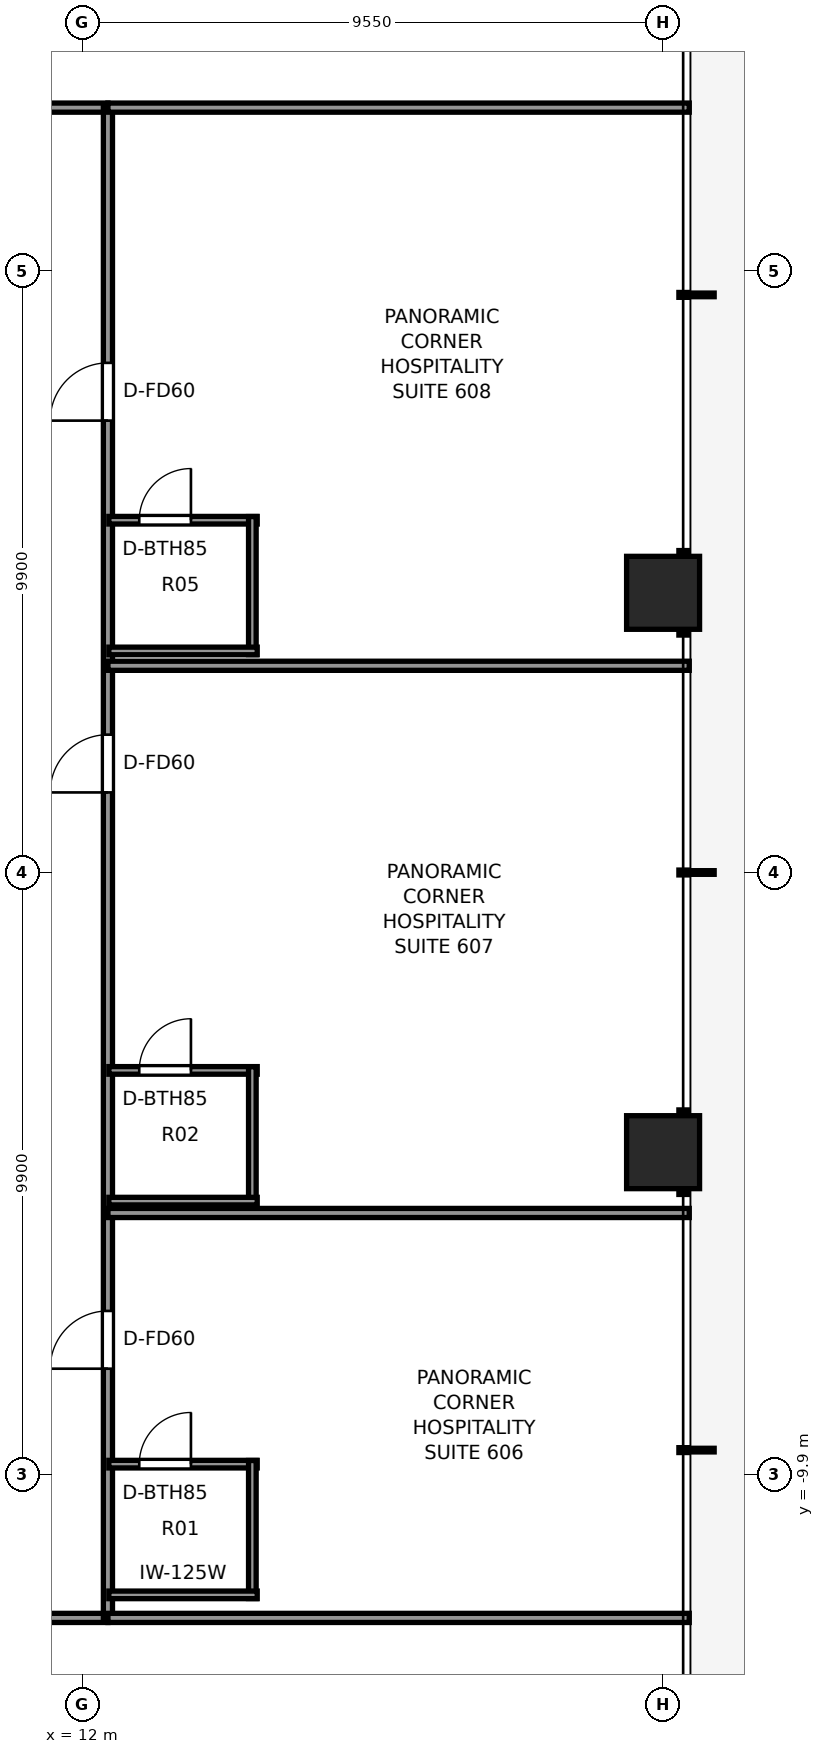
"""IFC4 building model, lengths in metres.
Left out: names, types, materials, properties, quantities, classifications, styles, units other than length and angle.
Written with IfcOpenShell. Run it as: python <this file> out.ifc"""

import sys

from ifc_helpers import new_model, si_unit, direction, frame, frame_2d, origin, origin_2d, place, context, subcontext, project, spatial, rectangle, extrude, element, fill, save


model = new_model("IFC4")
c1 = context("Model", 3, precision=1e-05, world=origin(), true_north=direction((0.0, 1.0)))
c2 = subcontext(c1, "Body", "Model", "MODEL_VIEW")
j1 = project(units=[si_unit("LENGTHUNIT", "METRE"), si_unit("PLANEANGLEUNIT", "RADIAN")], contexts=[c1])
p1 = place(None, origin())
s1 = spatial("IfcSite", under=j1, at=p1, CompositionType="ELEMENT")
p2 = place(p1, origin())
s2 = spatial("IfcBuilding", under=s1, at=p2, CompositionType="ELEMENT")
p3 = place(p2, frame((0.0, 0.0, 23.8)))
s3 = spatial("IfcBuildingStorey", under=s2, at=p3, CompositionType="ELEMENT", Elevation=23.8)
for number, where, z_axis, x_axis in (
    (1, (21.55, -4.6, 0.0), (0.0, 0.0, 1.0), (1.0, 0.0, 0.0)),
    (2, (21.55, 4.6, 0.0), (0.0, 0.0, 1.0), (1.0, 0.0, 0.0)),
):
    element("IfcColumn", number, at=place(p3, frame(where, z_axis=z_axis, x_axis=x_axis)), inside=s3, PredefinedType="COLUMN", context=c2, shape_type="SweptSolid", body=[
        extrude(rectangle(XDim=1.2, YDim=1.2, at=origin_2d()), origin(), (0.0, 0.0, 1.0), 3.3),
    ])
p4 = place(p3, frame((-12.26, -12.26, 0.0), z_axis=(0.0, 0.0, 1.0), x_axis=(1.0, 0.0, 0.0)))
e3 = element("IfcWall", 3, at=p4, inside=s3, PredefinedType="PARTITIONING", context=c2, shape_type="SweptSolid", body=[
    extrude(rectangle(XDim=24.68, YDim=0.15, at=frame_2d((12.34, 0.0))), origin(), (0.0, 0.0, 1.0), 2.272),
])
p5 = place(p4, frame((3.444, 0.0, 0.0)))
e4 = element("IfcOpeningElement", 4, at=p5, cuts=e3, PredefinedType="OPENING", context=c2, shape_type="SweptSolid", body=[
    extrude(rectangle(XDim=0.9, YDim=2.06, at=frame_2d((0.45, 1.03))), frame((0.0, 0.085, 0.0), z_axis=(0.0, -1.0, 0.0), x_axis=(1.0, 0.0, 0.0)), (0.0, 0.0, 1.0), 0.17),
])
p6 = place(p4, frame((5.779, 0.0, 0.0)))
e5 = element("IfcOpeningElement", 5, at=p6, cuts=e3, PredefinedType="OPENING", context=c2, shape_type="SweptSolid", body=[
    extrude(rectangle(XDim=0.9, YDim=2.06, at=frame_2d((0.45, 1.03))), frame((0.0, 0.085, 0.0), z_axis=(0.0, -1.0, 0.0), x_axis=(1.0, 0.0, 0.0)), (0.0, 0.0, 1.0), 0.17),
])
p7 = place(p4, frame((13.551, 0.0, 0.0)))
e6 = element("IfcOpeningElement", 6, at=p7, cuts=e3, PredefinedType="OPENING", context=c2, shape_type="SweptSolid", body=[
    extrude(rectangle(XDim=0.9, YDim=2.06, at=frame_2d((0.45, 1.03))), frame((0.0, 0.085, 0.0), z_axis=(0.0, -1.0, 0.0), x_axis=(1.0, 0.0, 0.0)), (0.0, 0.0, 1.0), 0.17),
])
p8 = place(p4, frame((17.921, 0.0, 0.0)))
e7 = element("IfcOpeningElement", 7, at=p8, cuts=e3, PredefinedType="OPENING", context=c2, shape_type="SweptSolid", body=[
    extrude(rectangle(XDim=0.9, YDim=2.06, at=frame_2d((0.45, 1.03))), frame((0.0, 0.085, 0.0), z_axis=(0.0, -1.0, 0.0), x_axis=(1.0, 0.0, 0.0)), (0.0, 0.0, 1.0), 0.17),
])
p9 = place(p4, frame((20.256, 0.0, 0.0)))
e8 = element("IfcOpeningElement", 8, at=p9, cuts=e3, PredefinedType="OPENING", context=c2, shape_type="SweptSolid", body=[
    extrude(rectangle(XDim=0.9, YDim=2.06, at=frame_2d((0.45, 1.03))), frame((0.0, 0.085, 0.0), z_axis=(0.0, -1.0, 0.0), x_axis=(1.0, 0.0, 0.0)), (0.0, 0.0, 1.0), 0.17),
])
p10 = place(p3, frame((-12.26, 12.58, 0.0), z_axis=(0.0, 0.0, 1.0), x_axis=(1.0, 0.0, 0.0)))
e9 = element("IfcWall", 9, at=p10, inside=s3, PredefinedType="PARTITIONING", context=c2, shape_type="SweptSolid", body=[
    extrude(rectangle(XDim=24.68, YDim=0.15, at=frame_2d((12.34, 0.0))), origin(), (0.0, 0.0, 1.0), 2.272),
])
p11 = place(p10, frame((3.444, 0.0, 0.0)))
e10 = element("IfcOpeningElement", 10, at=p11, cuts=e9, PredefinedType="OPENING", context=c2, shape_type="SweptSolid", body=[
    extrude(rectangle(XDim=0.9, YDim=2.06, at=frame_2d((0.45, 1.03))), frame((0.0, 0.085, 0.0), z_axis=(0.0, -1.0, 0.0), x_axis=(1.0, 0.0, 0.0)), (0.0, 0.0, 1.0), 0.17),
])
p12 = place(p10, frame((9.78, 0.0, 0.0)))
e11 = element("IfcOpeningElement", 11, at=p12, cuts=e9, PredefinedType="OPENING", context=c2, shape_type="SweptSolid", body=[
    extrude(rectangle(XDim=0.9, YDim=2.06, at=frame_2d((0.45, 1.03))), frame((0.0, 0.085, 0.0), z_axis=(0.0, -1.0, 0.0), x_axis=(1.0, 0.0, 0.0)), (0.0, 0.0, 1.0), 0.17),
])
p13 = place(p10, frame((19.345, 0.0, 0.0)))
e12 = element("IfcOpeningElement", 12, at=p13, cuts=e9, PredefinedType="OPENING", context=c2, shape_type="SweptSolid", body=[
    extrude(rectangle(XDim=0.9, YDim=2.06, at=frame_2d((0.45, 1.03))), frame((0.0, 0.085, 0.0), z_axis=(0.0, -1.0, 0.0), x_axis=(1.0, 0.0, 0.0)), (0.0, 0.0, 1.0), 0.17),
])
p14 = place(p3, frame((12.42, -12.26, 0.0), z_axis=(0.0, 0.0, 1.0), x_axis=(0.0, 1.0, 0.0)))
e13 = element("IfcWall", 13, at=p14, inside=s3, PredefinedType="PARTITIONING", context=c2, shape_type="SweptSolid", body=[
    extrude(rectangle(XDim=24.84, YDim=0.15, at=frame_2d((12.42, 0.0))), origin(), (0.0, 0.0, 1.0), 2.272),
])
p15 = place(p14, frame((4.099, 0.0, 0.0)))
e14 = element("IfcOpeningElement", 14, at=p15, cuts=e13, PredefinedType="OPENING", context=c2, shape_type="SweptSolid", body=[
    extrude(rectangle(XDim=0.95, YDim=2.06, at=frame_2d((0.475, 1.03))), frame((0.0, 0.085, 0.0), z_axis=(0.0, -1.0, 0.0), x_axis=(1.0, 0.0, 0.0)), (0.0, 0.0, 1.0), 0.17),
])
p16 = place(p14, frame((13.577, 0.0, 0.0)))
e15 = element("IfcOpeningElement", 15, at=p16, cuts=e13, PredefinedType="OPENING", context=c2, shape_type="SweptSolid", body=[
    extrude(rectangle(XDim=0.95, YDim=2.06, at=frame_2d((0.475, 1.03))), frame((0.0, 0.085, 0.0), z_axis=(0.0, -1.0, 0.0), x_axis=(1.0, 0.0, 0.0)), (0.0, 0.0, 1.0), 0.17),
])
p17 = place(p14, frame((19.692, 0.0, 0.0)))
e16 = element("IfcOpeningElement", 16, at=p17, cuts=e13, PredefinedType="OPENING", context=c2, shape_type="SweptSolid", body=[
    extrude(rectangle(XDim=0.95, YDim=2.06, at=frame_2d((0.475, 1.03))), frame((0.0, 0.085, 0.0), z_axis=(0.0, -1.0, 0.0), x_axis=(1.0, 0.0, 0.0)), (0.0, 0.0, 1.0), 0.17),
])
for number, where, z_axis, x_axis in (
    (17, (12.42, -12.26, 0.0), (0.0, 0.0, 1.0), (1.0, 0.0, 0.0)),
    (18, (12.42, 12.58, 0.0), (0.0, 0.0, 1.0), (1.0, 0.0, 0.0)),
):
    element("IfcWall", number, at=place(p3, frame(where, z_axis=z_axis, x_axis=x_axis)), inside=s3, PredefinedType="PARTITIONING", context=c2, shape_type="SweptSolid", body=[
        extrude(rectangle(XDim=9.56, YDim=0.15, at=frame_2d((4.78, 0.0))), origin(), (0.0, 0.0, 1.0), 2.272),
    ])
p18 = place(p3, frame((12.42, -5.6, 0.0), z_axis=(0.0, 0.0, 1.0), x_axis=(1.0, 0.0, 0.0)))
e19 = element("IfcWall", 19, at=p18, inside=s3, PredefinedType="PARTITIONING", context=c2, shape_type="SweptSolid", body=[
    extrude(rectangle(XDim=9.56, YDim=0.15, at=frame_2d((4.78, 0.0))), origin(), (0.0, 0.0, 1.0), 2.429),
])
p19 = place(p3, frame((12.435, -9.731, 0.0), z_axis=(0.0, 0.0, 1.0), x_axis=(1.0, 0.0, 0.0)))
e20 = element("IfcWall", 20, at=p19, inside=s3, PredefinedType="PARTITIONING", context=c2, shape_type="SweptSolid", body=[
    extrude(rectangle(XDim=2.44, YDim=0.125, at=frame_2d((1.22, 0.0))), origin(), (0.0, 0.0, 1.0), 3.06),
])
p20 = place(p19, frame((0.5, 0.0, 0.0)))
e21 = element("IfcOpeningElement", 21, at=p20, cuts=e20, PredefinedType="OPENING", context=c2, shape_type="SweptSolid", body=[
    extrude(rectangle(XDim=0.85, YDim=2.03, at=frame_2d((0.425, 1.015))), frame((0.0, 0.073, 0.0), z_axis=(0.0, -1.0, 0.0), x_axis=(1.0, 0.0, 0.0)), (0.0, 0.0, 1.0), 0.145),
])
p21 = place(p3, frame((14.795, -11.941, 0.0), z_axis=(0.0, 0.0, 1.0), x_axis=(0.0, 1.0, 0.0)))
e22 = element("IfcWall", 22, at=p21, inside=s3, PredefinedType="PARTITIONING", context=c2, shape_type="SweptSolid", body=[
    extrude(rectangle(XDim=2.27, YDim=0.125, at=frame_2d((1.135, 0.0))), origin(), (0.0, 0.0, 1.0), 2.272),
])
p22 = place(p3, frame((12.435, -11.881, 0.0), z_axis=(0.0, 0.0, 1.0), x_axis=(1.0, 0.0, 0.0)))
e23 = element("IfcWall", 23, at=p22, inside=s3, PredefinedType="PARTITIONING", context=c2, shape_type="SweptSolid", body=[
    extrude(rectangle(XDim=2.44, YDim=0.125, at=frame_2d((1.22, 0.0))), origin(), (0.0, 0.0, 1.0), 2.272),
])
p23 = place(p3, frame((12.42, 3.4, 0.0), z_axis=(0.0, 0.0, 1.0), x_axis=(1.0, 0.0, 0.0)))
e24 = element("IfcWall", 24, at=p23, inside=s3, PredefinedType="PARTITIONING", context=c2, shape_type="SweptSolid", body=[
    extrude(rectangle(XDim=9.56, YDim=0.15, at=frame_2d((4.78, 0.0))), origin(), (0.0, 0.0, 1.0), 2.429),
])
p24 = place(p3, frame((12.435, -3.255, 0.0), z_axis=(0.0, 0.0, 1.0), x_axis=(1.0, 0.0, 0.0)))
e25 = element("IfcWall", 25, at=p24, inside=s3, PredefinedType="PARTITIONING", context=c2, shape_type="SweptSolid", body=[
    extrude(rectangle(XDim=2.44, YDim=0.125, at=frame_2d((1.22, 0.0))), origin(), (0.0, 0.0, 1.0), 3.06),
])
p25 = place(p24, frame((0.5, 0.0, 0.0)))
e26 = element("IfcOpeningElement", 26, at=p25, cuts=e25, PredefinedType="OPENING", context=c2, shape_type="SweptSolid", body=[
    extrude(rectangle(XDim=0.85, YDim=2.03, at=frame_2d((0.425, 1.015))), frame((0.0, 0.073, 0.0), z_axis=(0.0, -1.0, 0.0), x_axis=(1.0, 0.0, 0.0)), (0.0, 0.0, 1.0), 0.145),
])
p26 = place(p3, frame((14.795, -5.465, 0.0), z_axis=(0.0, 0.0, 1.0), x_axis=(0.0, 1.0, 0.0)))
e27 = element("IfcWall", 27, at=p26, inside=s3, PredefinedType="PARTITIONING", context=c2, shape_type="SweptSolid", body=[
    extrude(rectangle(XDim=2.27, YDim=0.125, at=frame_2d((1.135, 0.0))), origin(), (0.0, 0.0, 1.0), 2.272),
])
p27 = place(p3, frame((12.435, -5.405, 0.0), z_axis=(0.0, 0.0, 1.0), x_axis=(1.0, 0.0, 0.0)))
e28 = element("IfcWall", 28, at=p27, inside=s3, PredefinedType="PARTITIONING", context=c2, shape_type="SweptSolid", body=[
    extrude(rectangle(XDim=2.44, YDim=0.125, at=frame_2d((1.22, 0.0))), origin(), (0.0, 0.0, 1.0), 3.06),
])
p28 = place(p3, frame((12.435, 5.794, 0.0), z_axis=(0.0, 0.0, 1.0), x_axis=(1.0, 0.0, 0.0)))
e29 = element("IfcWall", 29, at=p28, inside=s3, PredefinedType="PARTITIONING", context=c2, shape_type="SweptSolid", body=[
    extrude(rectangle(XDim=2.44, YDim=0.125, at=frame_2d((1.22, 0.0))), origin(), (0.0, 0.0, 1.0), 3.06),
])
p29 = place(p28, frame((0.5, 0.0, 0.0)))
e30 = element("IfcOpeningElement", 30, at=p29, cuts=e29, PredefinedType="OPENING", context=c2, shape_type="SweptSolid", body=[
    extrude(rectangle(XDim=0.85, YDim=2.03, at=frame_2d((0.425, 1.015))), frame((0.0, 0.073, 0.0), z_axis=(0.0, -1.0, 0.0), x_axis=(1.0, 0.0, 0.0)), (0.0, 0.0, 1.0), 0.145),
])
p30 = place(p3, frame((14.795, 3.584, 0.0), z_axis=(0.0, 0.0, 1.0), x_axis=(0.0, 1.0, 0.0)))
e31 = element("IfcWall", 31, at=p30, inside=s3, PredefinedType="PARTITIONING", context=c2, shape_type="SweptSolid", body=[
    extrude(rectangle(XDim=2.27, YDim=0.125, at=frame_2d((1.135, 0.0))), origin(), (0.0, 0.0, 1.0), 2.272),
])
p31 = place(p3, frame((12.435, 3.644, 0.0), z_axis=(0.0, 0.0, 1.0), x_axis=(1.0, 0.0, 0.0)))
e32 = element("IfcWall", 32, at=p31, inside=s3, PredefinedType="PARTITIONING", context=c2, shape_type="SweptSolid", body=[
    extrude(rectangle(XDim=2.44, YDim=0.125, at=frame_2d((1.22, 0.0))), origin(), (0.0, 0.0, 1.0), 3.06),
])
p32 = place(p20, origin())
e33 = element("IfcDoor", 33, at=p32, inside=s3, OperationType="SINGLE_SWING_RIGHT", PredefinedType="DOOR", context=c2, shape_type="SweptSolid", body=[
    extrude(rectangle(XDim=0.85, YDim=2.03, at=frame_2d((0.425, 1.015))), frame((0.0, 0.025, 0.0), z_axis=(0.0, -1.0, 0.0), x_axis=(1.0, 0.0, 0.0)), (0.0, 0.0, 1.0), 0.05),
])
fill(e21, e33)
p33 = place(p15, origin())
e34 = element("IfcDoor", 34, at=p33, inside=s3, OperationType="SINGLE_SWING_LEFT", PredefinedType="DOOR", context=c2, shape_type="SweptSolid", body=[
    extrude(rectangle(XDim=0.95, YDim=2.06, at=frame_2d((0.475, 1.03))), frame((0.0, 0.025, 0.0), z_axis=(0.0, -1.0, 0.0), x_axis=(1.0, 0.0, 0.0)), (0.0, 0.0, 1.0), 0.05),
])
fill(e14, e34)
p34 = place(p25, origin())
e35 = element("IfcDoor", 35, at=p34, inside=s3, OperationType="SINGLE_SWING_RIGHT", PredefinedType="DOOR", context=c2, shape_type="SweptSolid", body=[
    extrude(rectangle(XDim=0.85, YDim=2.03, at=frame_2d((0.425, 1.015))), frame((0.0, 0.025, 0.0), z_axis=(0.0, -1.0, 0.0), x_axis=(1.0, 0.0, 0.0)), (0.0, 0.0, 1.0), 0.05),
])
fill(e26, e35)
p35 = place(p16, origin())
e36 = element("IfcDoor", 36, at=p35, inside=s3, OperationType="SINGLE_SWING_LEFT", PredefinedType="DOOR", context=c2, shape_type="SweptSolid", body=[
    extrude(rectangle(XDim=0.95, YDim=2.06, at=frame_2d((0.475, 1.03))), frame((0.0, 0.025, 0.0), z_axis=(0.0, -1.0, 0.0), x_axis=(1.0, 0.0, 0.0)), (0.0, 0.0, 1.0), 0.05),
])
fill(e15, e36)
p36 = place(p29, origin())
e37 = element("IfcDoor", 37, at=p36, inside=s3, OperationType="SINGLE_SWING_RIGHT", PredefinedType="DOOR", context=c2, shape_type="SweptSolid", body=[
    extrude(rectangle(XDim=0.85, YDim=2.03, at=frame_2d((0.425, 1.015))), frame((0.0, 0.025, 0.0), z_axis=(0.0, -1.0, 0.0), x_axis=(1.0, 0.0, 0.0)), (0.0, 0.0, 1.0), 0.05),
])
fill(e30, e37)
p37 = place(p17, origin())
e38 = element("IfcDoor", 38, at=p37, inside=s3, OperationType="SINGLE_SWING_LEFT", PredefinedType="DOOR", context=c2, shape_type="SweptSolid", body=[
    extrude(rectangle(XDim=0.95, YDim=2.06, at=frame_2d((0.475, 1.03))), frame((0.0, 0.025, 0.0), z_axis=(0.0, -1.0, 0.0), x_axis=(1.0, 0.0, 0.0)), (0.0, 0.0, 1.0), 0.05),
])
fill(e16, e38)
save(model, sys.argv[1])
